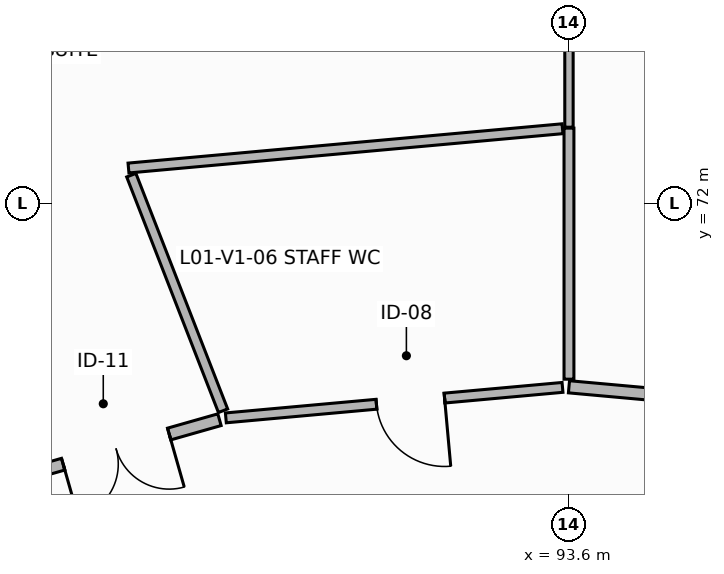
"""IFC4 building model, lengths in metres.
Left out: names, types, materials, properties, quantities, classifications, styles, units other than length and angle.
Written with IfcOpenShell. Run it as: python <this file> out.ifc"""

import sys

from ifc_helpers import new_model, si_unit, direction, frame, frame_2d, origin, place, context, subcontext, project, spatial, rectangle, extrude, element, fill, save


model = new_model("IFC4")
c1 = context("Model", 3, precision=1e-05, world=origin(), true_north=direction((0.0, 1.0)))
c2 = subcontext(c1, "Body", "Model", "MODEL_VIEW")
j1 = project(units=[si_unit("LENGTHUNIT", "METRE"), si_unit("PLANEANGLEUNIT", "RADIAN")], contexts=[c1])
p1 = place(None, origin())
s1 = spatial("IfcSite", under=j1, at=p1, CompositionType="ELEMENT")
p2 = place(p1, origin())
s2 = spatial("IfcBuilding", under=s1, at=p2, CompositionType="ELEMENT")
p3 = place(p2, frame((0.0, 0.0, 4.5)))
s3 = spatial("IfcBuildingStorey", under=s2, at=p3, CompositionType="ELEMENT", Elevation=4.5)
p4 = place(p3, frame((98.014, 69.19, 0.0), z_axis=(0.0, 0.0, 1.0), x_axis=(-0.995915752095, 0.090287400724, 0.0)))
e1 = element("IfcWall", 1, at=p4, inside=s3, PredefinedType="PARTITIONING", context=c2, shape_type="SweptSolid", body=[
    extrude(rectangle(XDim=4.432, YDim=0.16, at=frame_2d((2.216, 0.0))), origin(), (0.0, 0.0, 1.0), 2.99),
])
p5 = place(p4, frame((1.839, 0.0, 0.0)))
e2 = element("IfcOpeningElement", 2, at=p5, cuts=e1, PredefinedType="OPENING", context=c2, shape_type="SweptSolid", body=[
    extrude(rectangle(XDim=0.98, YDim=2.15, at=frame_2d((0.49, 1.075))), frame((0.0, 0.09, 0.0), z_axis=(0.0, -1.0, 0.0), x_axis=(1.0, 0.0, 0.0)), (0.0, 0.0, 1.0), 0.18),
])
p6 = place(p3, frame((93.6, 69.69, 0.0), z_axis=(0.0, 0.0, 1.0), x_axis=(0.0, 1.0, 0.0)))
e3 = element("IfcWall", 3, at=p6, inside=s3, PredefinedType="PARTITIONING", context=c2, shape_type="SweptSolid", body=[
    extrude(rectangle(XDim=3.303, YDim=0.13, at=frame_2d((1.651, 0.0))), origin(), (0.0, 0.0, 1.0), 2.99),
])
p7 = place(p3, frame((93.6, 73.005, 0.0), z_axis=(0.0, 0.0, 1.0), x_axis=(0.0, 1.0, 0.0)))
e4 = element("IfcWall", 4, at=p7, inside=s3, PredefinedType="PARTITIONING", context=c2, shape_type="SweptSolid", body=[
    extrude(rectangle(XDim=6.245, YDim=0.11, at=frame_2d((3.123, 0.0))), origin(), (0.0, 0.0, 1.0), 2.99),
])
p8 = place(p3, frame((87.805, 72.468, 0.0), z_axis=(0.0, 0.0, 1.0), x_axis=(0.995924559999, 0.090190192324, 0.0)))
e5 = element("IfcWall", 5, at=p8, inside=s3, PredefinedType="PARTITIONING", context=c2, shape_type="SweptSolid", body=[
    extrude(rectangle(XDim=5.733, YDim=0.13, at=frame_2d((2.867, 0.0))), origin(), (0.0, 0.0, 1.0), 2.99),
])
p9 = place(p3, frame((93.515, 69.582, 0.0), z_axis=(0.0, 0.0, 1.0), x_axis=(-0.995923749059, -0.090199146668, 0.0)))
e6 = element("IfcWall", 6, at=p9, inside=s3, PredefinedType="PARTITIONING", context=c2, shape_type="SweptSolid", body=[
    extrude(rectangle(XDim=4.447, YDim=0.13, at=frame_2d((2.224, 0.0))), origin(), (0.0, 0.0, 1.0), 2.99),
])
p10 = place(p9, frame((1.558, 0.0, 0.0)))
e7 = element("IfcOpeningElement", 7, at=p10, cuts=e6, PredefinedType="OPENING", context=c2, shape_type="SweptSolid", body=[
    extrude(rectangle(XDim=0.9, YDim=2.1, at=frame_2d((0.45, 1.05))), frame((0.0, 0.075, 0.0), z_axis=(0.0, -1.0, 0.0), x_axis=(1.0, 0.0, 0.0)), (0.0, 0.0, 1.0), 0.15),
])
p11 = place(p3, frame((89.049, 69.275, 0.0), z_axis=(0.0, 0.0, 1.0), x_axis=(-0.362920895293, 0.931819952437, 0.0)))
e8 = element("IfcWall", 8, at=p11, inside=s3, PredefinedType="PARTITIONING", context=c2, shape_type="SweptSolid", body=[
    extrude(rectangle(XDim=3.326, YDim=0.13, at=frame_2d((1.663, 0.0))), origin(), (0.0, 0.0, 1.0), 2.99),
])
p12 = place(p3, frame((89.002, 69.157, 0.0), z_axis=(0.0, 0.0, 1.0), x_axis=(-0.961809330403, -0.273720317021, 0.0)))
e9 = element("IfcWall", 9, at=p12, inside=s3, PredefinedType="PARTITIONING", context=c2, shape_type="SweptSolid", body=[
    extrude(rectangle(XDim=4.286, YDim=0.16, at=frame_2d((2.143, 0.0))), origin(), (0.0, 0.0, 1.0), 2.99),
])
p13 = place(p12, frame((0.688, 0.0, 0.0)))
e10 = element("IfcOpeningElement", 10, at=p13, cuts=e9, PredefinedType="OPENING", context=c2, shape_type="SweptSolid", body=[
    extrude(rectangle(XDim=1.45, YDim=2.25, at=frame_2d((0.725, 1.125))), frame((0.0, 0.09, 0.0), z_axis=(0.0, -1.0, 0.0), x_axis=(1.0, 0.0, 0.0)), (0.0, 0.0, 1.0), 0.18),
])
p14 = place(p10, origin())
e11 = element("IfcDoor", 11, at=p14, inside=s3, OperationType="SINGLE_SWING_LEFT", PredefinedType="DOOR", context=c2, shape_type="SweptSolid", body=[
    extrude(rectangle(XDim=0.9, YDim=2.1, at=frame_2d((0.45, 1.05))), frame((0.0, 0.025, 0.0), z_axis=(0.0, -1.0, 0.0), x_axis=(1.0, 0.0, 0.0)), (0.0, 0.0, 1.0), 0.05),
])
fill(e7, e11)
p15 = place(p13, origin())
e12 = element("IfcDoor", 12, at=p15, inside=s3, OperationType="DOUBLE_DOOR_SINGLE_SWING", PredefinedType="DOOR", context=c2, shape_type="SweptSolid", body=[
    extrude(rectangle(XDim=1.45, YDim=2.25, at=frame_2d((0.725, 1.125))), frame((0.0, 0.025, 0.0), z_axis=(0.0, -1.0, 0.0), x_axis=(1.0, 0.0, 0.0)), (0.0, 0.0, 1.0), 0.05),
])
fill(e10, e12)
save(model, sys.argv[1])
